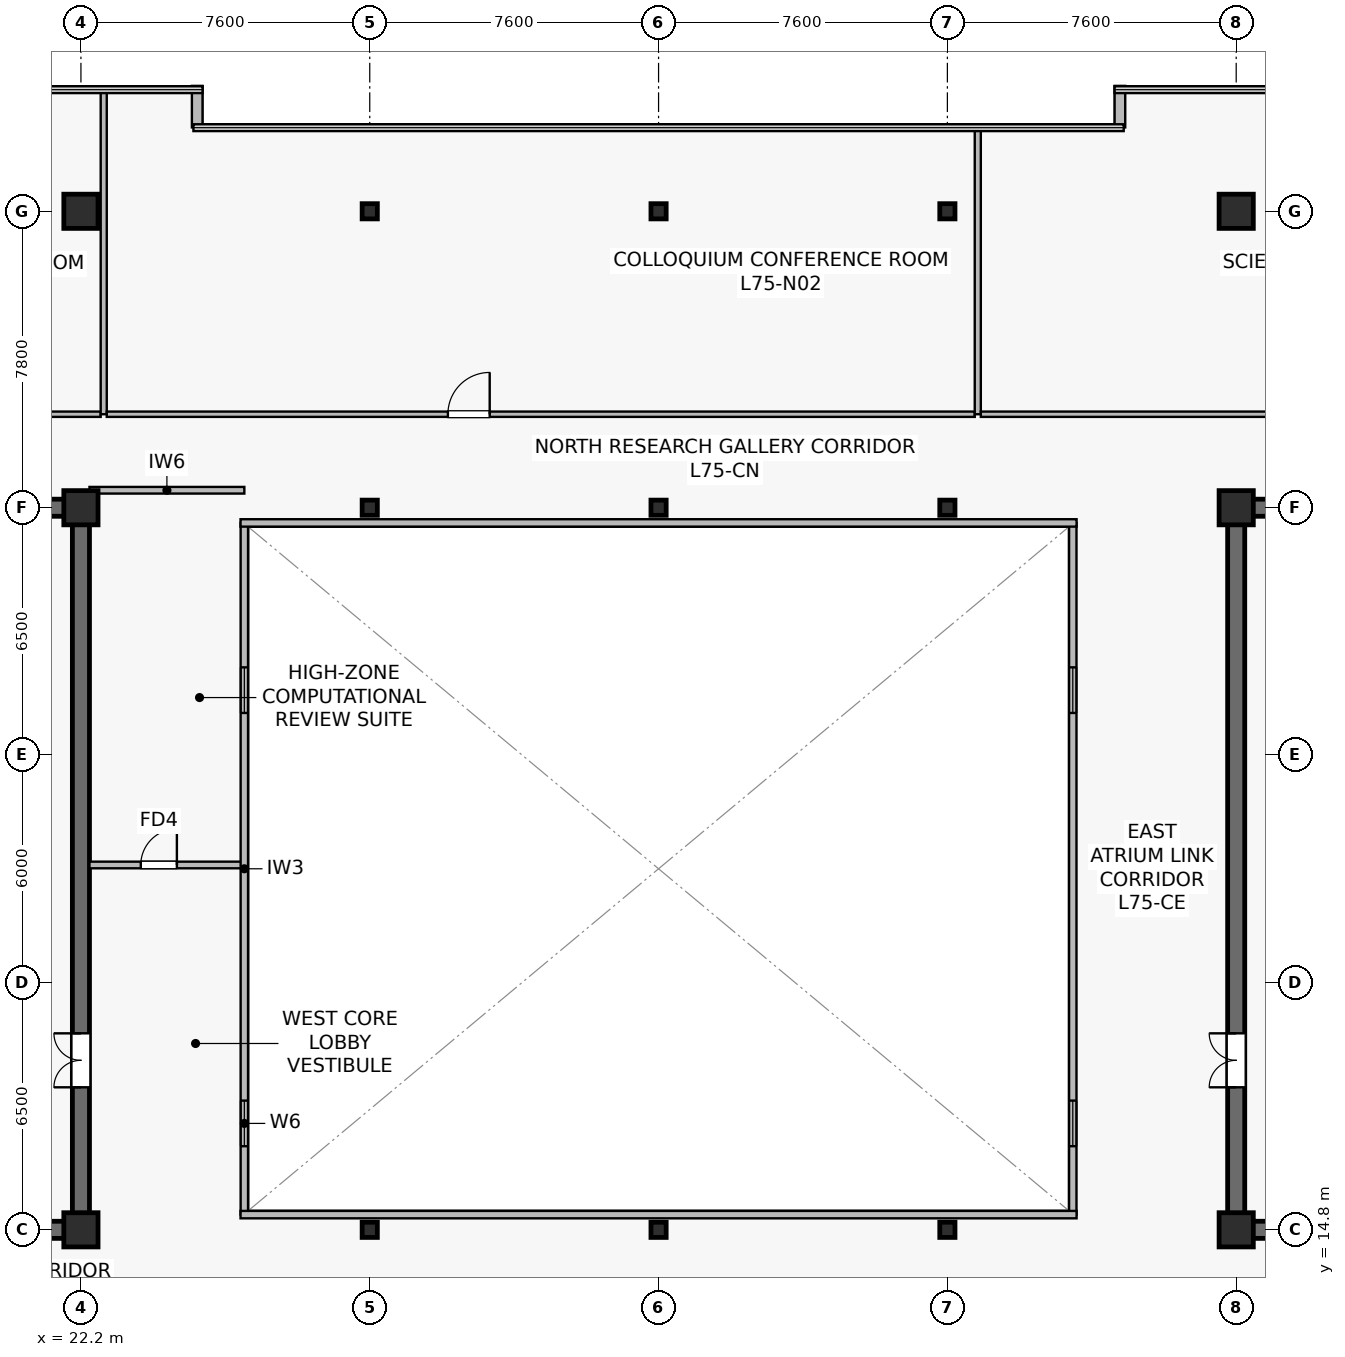
"""IFC4 building model, lengths in metres.
Left out: names, types, materials, properties, quantities, classifications, styles, units other than length and angle.
Written with IfcOpenShell. Run it as: python <this file> out.ifc"""

import sys

from ifc_helpers import new_model, si_unit, direction, frame, frame_2d, origin, origin_2d, place, context, subcontext, project, spatial, rectangle, i_section, extrude, source, transform, mapped, element, fill, save


model = new_model("IFC4")
c1 = context("Model", 3, precision=1e-05, world=origin(), true_north=direction((0.0, 1.0)))
c2 = subcontext(c1, "Body", "Model", "MODEL_VIEW")
j1 = project(units=[si_unit("LENGTHUNIT", "METRE"), si_unit("PLANEANGLEUNIT", "RADIAN")], contexts=[c1])
p1 = place(None, origin())
s1 = spatial("IfcSite", under=j1, at=p1, CompositionType="ELEMENT")
p2 = place(p1, origin())
s2 = spatial("IfcBuilding", under=s1, at=p2, CompositionType="ELEMENT")
p3 = place(p2, frame((0.0, 0.0, 314.4)))
s3 = spatial("IfcBuildingStorey", under=s2, at=p3, CompositionType="ELEMENT", Elevation=314.4)
p4 = place(p3, frame((7.175, 14.8, 0.0), z_axis=(0.0, 0.0, 1.0), x_axis=(1.0, 0.0, 0.0)))
e1 = element("IfcWall", 1, at=p4, inside=s3, PredefinedType="SHEAR", context=c2, shape_type="SweptSolid", body=[
    extrude(rectangle(XDim=15.25, YDim=0.45, at=frame_2d((7.625, 0.0))), origin(), (0.0, 0.0, 1.0), 3.9),
])
p5 = place(p3, frame((7.175, 33.8, 0.0), z_axis=(0.0, 0.0, 1.0), x_axis=(1.0, 0.0, 0.0)))
e2 = element("IfcWall", 2, at=p5, inside=s3, PredefinedType="SHEAR", context=c2, shape_type="SweptSolid", body=[
    extrude(rectangle(XDim=15.25, YDim=0.45, at=frame_2d((7.625, 0.0))), origin(), (0.0, 0.0, 1.0), 3.9),
])
p6 = place(p5, frame((5.15, 0.0, 0.0)))
e3 = element("IfcOpeningElement", 3, at=p6, cuts=e2, PredefinedType="OPENING", context=c2, shape_type="SweptSolid", body=[
    extrude(rectangle(XDim=0.95, YDim=2.15, at=frame_2d((0.475, 1.075))), frame((0.0, 0.235, 0.0), z_axis=(0.0, -1.0, 0.0), x_axis=(1.0, 0.0, 0.0)), (0.0, 0.0, 1.0), 0.47),
])
p7 = place(p5, frame((7.665, 0.0, 0.0)))
e4 = element("IfcOpeningElement", 4, at=p7, cuts=e2, PredefinedType="OPENING", context=c2, shape_type="SweptSolid", body=[
    extrude(rectangle(XDim=0.95, YDim=2.15, at=frame_2d((0.475, 1.075))), frame((0.0, 0.235, 0.0), z_axis=(0.0, -1.0, 0.0), x_axis=(1.0, 0.0, 0.0)), (0.0, 0.0, 1.0), 0.47),
])
p8 = place(p5, frame((10.215, 0.0, 0.0)))
e5 = element("IfcOpeningElement", 5, at=p8, cuts=e2, PredefinedType="OPENING", context=c2, shape_type="SweptSolid", body=[
    extrude(rectangle(XDim=0.95, YDim=2.15, at=frame_2d((0.475, 1.075))), frame((0.0, 0.235, 0.0), z_axis=(0.0, -1.0, 0.0), x_axis=(1.0, 0.0, 0.0)), (0.0, 0.0, 1.0), 0.47),
])
p9 = place(p5, frame((12.765, 0.0, 0.0)))
e6 = element("IfcOpeningElement", 6, at=p9, cuts=e2, PredefinedType="OPENING", context=c2, shape_type="SweptSolid", body=[
    extrude(rectangle(XDim=0.95, YDim=2.15, at=frame_2d((0.475, 1.075))), frame((0.0, 0.235, 0.0), z_axis=(0.0, -1.0, 0.0), x_axis=(1.0, 0.0, 0.0)), (0.0, 0.0, 1.0), 0.47),
])
p10 = place(p3, frame((22.2, 15.025, 0.0), z_axis=(0.0, 0.0, 1.0), x_axis=(0.0, 1.0, 0.0)))
e7 = element("IfcWall", 7, at=p10, inside=s3, PredefinedType="SHEAR", context=c2, shape_type="SweptSolid", body=[
    extrude(rectangle(XDim=18.55, YDim=0.45, at=frame_2d((9.275, 0.0))), origin(), (0.0, 0.0, 1.0), 3.9),
])
p11 = place(p10, frame((3.525, 0.0, 0.0)))
e8 = element("IfcOpeningElement", 8, at=p11, cuts=e7, PredefinedType="OPENING", context=c2, shape_type="SweptSolid", body=[
    extrude(rectangle(XDim=1.42, YDim=2.2, at=frame_2d((0.71, 1.1))), frame((0.0, 0.235, 0.0), z_axis=(0.0, -1.0, 0.0), x_axis=(1.0, 0.0, 0.0)), (0.0, 0.0, 1.0), 0.47),
])
p12 = place(p3, frame((52.375, 14.8, 0.0), z_axis=(0.0, 0.0, 1.0), x_axis=(1.0, 0.0, 0.0)))
e9 = element("IfcWall", 9, at=p12, inside=s3, PredefinedType="SHEAR", context=c2, shape_type="SweptSolid", body=[
    extrude(rectangle(XDim=15.25, YDim=0.45, at=frame_2d((7.625, 0.0))), origin(), (0.0, 0.0, 1.0), 3.9),
])
p13 = place(p3, frame((52.375, 33.8, 0.0), z_axis=(0.0, 0.0, 1.0), x_axis=(1.0, 0.0, 0.0)))
e10 = element("IfcWall", 10, at=p13, inside=s3, PredefinedType="SHEAR", context=c2, shape_type="SweptSolid", body=[
    extrude(rectangle(XDim=15.25, YDim=0.45, at=frame_2d((7.625, 0.0))), origin(), (0.0, 0.0, 1.0), 3.9),
])
p14 = place(p13, frame((9.15, 0.0, 0.0)))
e11 = element("IfcOpeningElement", 11, at=p14, cuts=e10, PredefinedType="OPENING", context=c2, shape_type="SweptSolid", body=[
    extrude(rectangle(XDim=0.95, YDim=2.15, at=frame_2d((0.475, 1.075))), frame((0.0, 0.235, 0.0), z_axis=(0.0, -1.0, 0.0), x_axis=(1.0, 0.0, 0.0)), (0.0, 0.0, 1.0), 0.47),
])
p15 = place(p13, frame((6.635, 0.0, 0.0)))
e12 = element("IfcOpeningElement", 12, at=p15, cuts=e10, PredefinedType="OPENING", context=c2, shape_type="SweptSolid", body=[
    extrude(rectangle(XDim=0.95, YDim=2.15, at=frame_2d((0.475, 1.075))), frame((0.0, 0.235, 0.0), z_axis=(0.0, -1.0, 0.0), x_axis=(1.0, 0.0, 0.0)), (0.0, 0.0, 1.0), 0.47),
])
p16 = place(p13, frame((4.085, 0.0, 0.0)))
e13 = element("IfcOpeningElement", 13, at=p16, cuts=e10, PredefinedType="OPENING", context=c2, shape_type="SweptSolid", body=[
    extrude(rectangle(XDim=0.95, YDim=2.15, at=frame_2d((0.475, 1.075))), frame((0.0, 0.235, 0.0), z_axis=(0.0, -1.0, 0.0), x_axis=(1.0, 0.0, 0.0)), (0.0, 0.0, 1.0), 0.47),
])
p17 = place(p13, frame((1.535, 0.0, 0.0)))
e14 = element("IfcOpeningElement", 14, at=p17, cuts=e10, PredefinedType="OPENING", context=c2, shape_type="SweptSolid", body=[
    extrude(rectangle(XDim=0.95, YDim=2.15, at=frame_2d((0.475, 1.075))), frame((0.0, 0.235, 0.0), z_axis=(0.0, -1.0, 0.0), x_axis=(1.0, 0.0, 0.0)), (0.0, 0.0, 1.0), 0.47),
])
p18 = place(p3, frame((52.6, 15.025, 0.0), z_axis=(0.0, 0.0, 1.0), x_axis=(0.0, 1.0, 0.0)))
e15 = element("IfcWall", 15, at=p18, inside=s3, PredefinedType="SHEAR", context=c2, shape_type="SweptSolid", body=[
    extrude(rectangle(XDim=18.55, YDim=0.45, at=frame_2d((9.275, 0.0))), origin(), (0.0, 0.0, 1.0), 3.9),
])
p19 = place(p18, frame((3.525, 0.0, 0.0)))
e16 = element("IfcOpeningElement", 16, at=p19, cuts=e15, PredefinedType="OPENING", context=c2, shape_type="SweptSolid", body=[
    extrude(rectangle(XDim=1.42, YDim=2.2, at=frame_2d((0.71, 1.1))), frame((0.0, 0.235, 0.0), z_axis=(0.0, -1.0, 0.0), x_axis=(1.0, 0.0, 0.0)), (0.0, 0.0, 1.0), 0.47),
])
m1 = source(origin(), c2, "Body", "SweptSolid", [
    extrude(rectangle(XDim=0.9, YDim=0.9, at=origin_2d()), origin(), (0.0, 0.0, 1.0), 4.2),
])
for number, where, z_axis, x_axis in (
    (17, (22.2, 14.8, 0.0), (0.0, 0.0, 1.0), (1.0, 0.0, 0.0)),
    (18, (22.2, 33.8, 0.0), (0.0, 0.0, 1.0), (1.0, 0.0, 0.0)),
    (19, (22.2, 41.6, 0.0), (0.0, 0.0, 1.0), (1.0, 0.0, 0.0)),
    (20, (52.6, 14.8, 0.0), (0.0, 0.0, 1.0), (1.0, 0.0, 0.0)),
    (21, (52.6, 33.8, 0.0), (0.0, 0.0, 1.0), (1.0, 0.0, 0.0)),
    (22, (52.6, 41.6, 0.0), (0.0, 0.0, 1.0), (1.0, 0.0, 0.0)),
):
    element("IfcColumn", number, at=place(p3, frame(where, z_axis=z_axis, x_axis=x_axis)), inside=s3, PredefinedType="COLUMN", context=c2, shape_type="MappedRepresentation", body=[
        mapped(m1, transform((0.0, 0.0, 0.0), scale=1.0)),
    ])
m2 = source(origin(), c2, "Body", "SweptSolid", [
    extrude(i_section(OverallWidth=0.4, OverallDepth=0.4, WebThickness=0.021, FlangeThickness=0.021, at=origin_2d()), origin(), (0.0, 0.0, 1.0), 4.2),
])
for number, where, z_axis, x_axis in (
    (23, (29.8, 14.8, 0.0), (0.0, 0.0, 1.0), (1.0, 0.0, 0.0)),
    (24, (29.8, 33.8, 0.0), (0.0, 0.0, 1.0), (1.0, 0.0, 0.0)),
    (25, (29.8, 41.6, 0.0), (0.0, 0.0, 1.0), (1.0, 0.0, 0.0)),
    (26, (37.4, 14.8, 0.0), (0.0, 0.0, 1.0), (1.0, 0.0, 0.0)),
    (27, (37.4, 33.8, 0.0), (0.0, 0.0, 1.0), (1.0, 0.0, 0.0)),
    (28, (37.4, 41.6, 0.0), (0.0, 0.0, 1.0), (1.0, 0.0, 0.0)),
    (29, (45.0, 14.8, 0.0), (0.0, 0.0, 1.0), (1.0, 0.0, 0.0)),
    (30, (45.0, 33.8, 0.0), (0.0, 0.0, 1.0), (1.0, 0.0, 0.0)),
    (31, (45.0, 41.6, 0.0), (0.0, 0.0, 1.0), (1.0, 0.0, 0.0)),
):
    element("IfcColumn", number, at=place(p3, frame(where, z_axis=z_axis, x_axis=x_axis)), inside=s3, PredefinedType="COLUMN", context=c2, shape_type="MappedRepresentation", body=[
        mapped(m2, transform((0.0, 0.0, 0.0), scale=1.0)),
    ])
for number, where, z_axis, x_axis in (
    (32, (49.54, 44.9, 0.0), (0.0, 0.0, 1.0), (0.0, -1.0, 0.0)),
    (33, (25.26, 43.807, 0.0), (0.0, 0.0, 1.0), (0.0, 1.0, 0.0)),
):
    element("IfcWall", number, at=place(p3, frame(where, z_axis=z_axis, x_axis=x_axis)), inside=s3, PredefinedType="STANDARD", context=c2, shape_type="SweptSolid", body=[
        extrude(rectangle(XDim=1.093, YDim=0.28, at=frame_2d((0.546, 0.0))), origin(), (0.0, 0.0, 1.0), 3.9),
    ])
p20 = place(p3, frame((22.425, 34.26, 0.0), z_axis=(0.0, 0.0, 1.0), x_axis=(1.0, 0.0, 0.0)))
e34 = element("IfcWall", 34, at=p20, inside=s3, PredefinedType="PARTITIONING", context=c2, shape_type="SweptSolid", body=[
    extrude(rectangle(XDim=4.075, YDim=0.175, at=frame_2d((2.038, 0.0))), origin(), (0.0, 0.0, 1.0), 3.635),
])
p21 = place(p3, frame((22.425, 24.4, 0.0), z_axis=(0.0, 0.0, 1.0), x_axis=(1.0, 0.0, 0.0)))
e35 = element("IfcWall", 35, at=p21, inside=s3, PredefinedType="PARTITIONING", context=c2, shape_type="SweptSolid", body=[
    extrude(rectangle(XDim=4.075, YDim=0.175, at=frame_2d((2.038, 0.0))), origin(), (0.0, 0.0, 1.0), 3.9),
])
p22 = place(p21, frame((1.35, 0.0, 0.0)))
e36 = element("IfcOpeningElement", 36, at=p22, cuts=e35, PredefinedType="OPENING", context=c2, shape_type="SweptSolid", body=[
    extrude(rectangle(XDim=0.95, YDim=2.15, at=frame_2d((0.475, 1.075))), frame((0.0, 0.098, 0.0), z_axis=(0.0, -1.0, 0.0), x_axis=(1.0, 0.0, 0.0)), (0.0, 0.0, 1.0), 0.195),
])
p23 = place(p3, frame((26.5, 15.2, 0.0), z_axis=(0.0, 0.0, 1.0), x_axis=(0.0, 1.0, 0.0)))
e37 = element("IfcWall", 37, at=p23, inside=s3, PredefinedType="SOLIDWALL", context=c2, shape_type="SweptSolid", body=[
    extrude(rectangle(XDim=18.2, YDim=0.195, at=frame_2d((9.1, 0.0))), origin(), (0.0, 0.0, 1.0), 3.9),
])
p24 = place(p23, frame((1.8, 0.0, 0.9)))
e38 = element("IfcOpeningElement", 38, at=p24, cuts=e37, PredefinedType="OPENING", context=c2, shape_type="SweptSolid", body=[
    extrude(rectangle(XDim=1.2, YDim=1.35, at=frame_2d((0.6, 0.675))), frame((0.0, 0.107, 0.0), z_axis=(0.0, -1.0, 0.0), x_axis=(1.0, 0.0, 0.0)), (0.0, 0.0, 1.0), 0.215),
])
p25 = place(p23, frame((13.2, 0.0, 0.9)))
e39 = element("IfcOpeningElement", 39, at=p25, cuts=e37, PredefinedType="OPENING", context=c2, shape_type="SweptSolid", body=[
    extrude(rectangle(XDim=1.2, YDim=1.35, at=frame_2d((0.6, 0.675))), frame((0.0, 0.107, 0.0), z_axis=(0.0, -1.0, 0.0), x_axis=(1.0, 0.0, 0.0)), (0.0, 0.0, 1.0), 0.215),
])
p26 = place(p3, frame((48.3, 15.2, 0.0), z_axis=(0.0, 0.0, 1.0), x_axis=(0.0, 1.0, 0.0)))
e40 = element("IfcWall", 40, at=p26, inside=s3, PredefinedType="SOLIDWALL", context=c2, shape_type="SweptSolid", body=[
    extrude(rectangle(XDim=18.2, YDim=0.195, at=frame_2d((9.1, 0.0))), origin(), (0.0, 0.0, 1.0), 3.9),
])
p27 = place(p26, frame((1.8, 0.0, 0.9)))
e41 = element("IfcOpeningElement", 41, at=p27, cuts=e40, PredefinedType="OPENING", context=c2, shape_type="SweptSolid", body=[
    extrude(rectangle(XDim=1.2, YDim=1.35, at=frame_2d((0.6, 0.675))), frame((0.0, 0.107, 0.0), z_axis=(0.0, -1.0, 0.0), x_axis=(1.0, 0.0, 0.0)), (0.0, 0.0, 1.0), 0.215),
])
p28 = place(p26, frame((13.2, 0.0, 0.9)))
e42 = element("IfcOpeningElement", 42, at=p28, cuts=e40, PredefinedType="OPENING", context=c2, shape_type="SweptSolid", body=[
    extrude(rectangle(XDim=1.2, YDim=1.35, at=frame_2d((0.6, 0.675))), frame((0.0, 0.107, 0.0), z_axis=(0.0, -1.0, 0.0), x_axis=(1.0, 0.0, 0.0)), (0.0, 0.0, 1.0), 0.215),
])
for number, where, z_axis, x_axis in (
    (43, (26.4, 15.2, 0.0), (0.0, 0.0, 1.0), (1.0, 0.0, 0.0)),
    (44, (26.4, 33.4, 0.0), (0.0, 0.0, 1.0), (1.0, 0.0, 0.0)),
):
    element("IfcWall", number, at=place(p3, frame(where, z_axis=z_axis, x_axis=x_axis)), inside=s3, PredefinedType="SOLIDWALL", context=c2, shape_type="SweptSolid", body=[
        extrude(rectangle(XDim=22.0, YDim=0.195, at=frame_2d((11.0, 0.0))), origin(), (0.0, 0.0, 1.0), 3.9),
    ])
p29 = place(p3, frame((5.91, 36.26, 0.0), z_axis=(0.0, 0.0, 1.0), x_axis=(1.0, 0.0, 0.0)))
e45 = element("IfcWall", 45, at=p29, inside=s3, PredefinedType="PARTITIONING", context=c2, shape_type="SweptSolid", body=[
    extrude(rectangle(XDim=16.81, YDim=0.14, at=frame_2d((8.405, 0.0))), origin(), (0.0, 0.0, 1.0), 3.297),
])
p30 = place(p29, frame((8.305, 0.0, 0.0)))
e46 = element("IfcOpeningElement", 46, at=p30, cuts=e45, PredefinedType="OPENING", context=c2, shape_type="SweptSolid", body=[
    extrude(rectangle(XDim=1.1, YDim=2.18, at=frame_2d((0.55, 1.09))), frame((0.0, 0.08, 0.0), z_axis=(0.0, -1.0, 0.0), x_axis=(1.0, 0.0, 0.0)), (0.0, 0.0, 1.0), 0.16),
])
p31 = place(p3, frame((22.8, 36.26, 0.0), z_axis=(0.0, 0.0, 1.0), x_axis=(0.0, 1.0, 0.0)))
e47 = element("IfcWall", 47, at=p31, inside=s3, PredefinedType="PARTITIONING", context=c2, shape_type="SweptSolid", body=[
    extrude(rectangle(XDim=8.53, YDim=0.16, at=frame_2d((4.265, 0.0))), origin(), (0.0, 0.0, 1.0), 2.985),
])
p32 = place(p3, frame((22.88, 36.26, 0.0), z_axis=(0.0, 0.0, 1.0), x_axis=(1.0, 0.0, 0.0)))
e48 = element("IfcWall", 48, at=p32, inside=s3, PredefinedType="PARTITIONING", context=c2, shape_type="SweptSolid", body=[
    extrude(rectangle(XDim=22.84, YDim=0.14, at=frame_2d((11.42, 0.0))), origin(), (0.0, 0.0, 1.0), 3.297),
])
p33 = place(p32, frame((8.976, 0.0, 0.0)))
e49 = element("IfcOpeningElement", 49, at=p33, cuts=e48, PredefinedType="OPENING", context=c2, shape_type="SweptSolid", body=[
    extrude(rectangle(XDim=1.1, YDim=2.18, at=frame_2d((0.55, 1.09))), frame((0.0, 0.08, 0.0), z_axis=(0.0, -1.0, 0.0), x_axis=(1.0, 0.0, 0.0)), (0.0, 0.0, 1.0), 0.16),
])
p34 = place(p3, frame((45.8, 36.26, 0.0), z_axis=(0.0, 0.0, 1.0), x_axis=(0.0, 1.0, 0.0)))
e50 = element("IfcWall", 50, at=p34, inside=s3, PredefinedType="PARTITIONING", context=c2, shape_type="SweptSolid", body=[
    extrude(rectangle(XDim=7.53, YDim=0.16, at=frame_2d((3.765, 0.0))), origin(), (0.0, 0.0, 1.0), 2.985),
])
p35 = place(p3, frame((45.88, 36.26, 0.0), z_axis=(0.0, 0.0, 1.0), x_axis=(1.0, 0.0, 0.0)))
e51 = element("IfcWall", 51, at=p35, inside=s3, PredefinedType="PARTITIONING", context=c2, shape_type="SweptSolid", body=[
    extrude(rectangle(XDim=23.01, YDim=0.14, at=frame_2d((11.505, 0.0))), origin(), (0.0, 0.0, 1.0), 3.297),
])
p36 = place(p35, frame((11.591, 0.0, 0.0)))
e52 = element("IfcOpeningElement", 52, at=p36, cuts=e51, PredefinedType="OPENING", context=c2, shape_type="SweptSolid", body=[
    extrude(rectangle(XDim=1.1, YDim=2.18, at=frame_2d((0.55, 1.09))), frame((0.0, 0.08, 0.0), z_axis=(0.0, -1.0, 0.0), x_axis=(1.0, 0.0, 0.0)), (0.0, 0.0, 1.0), 0.16),
])
m3 = source(origin(), c2, "Body", "SweptSolid", [
    extrude(rectangle(XDim=1.2, YDim=1.35, at=frame_2d((0.6, 0.675))), frame((0.0, 0.03, 0.0), z_axis=(0.0, -1.0, 0.0), x_axis=(1.0, 0.0, 0.0)), (0.0, 0.0, 1.0), 0.06),
])
p37 = place(p24, origin())
e53 = element("IfcWindow", 53, at=p37, inside=s3, PartitioningType="SINGLE_PANEL", PredefinedType="WINDOW", context=c2, shape_type="MappedRepresentation", body=[
    mapped(m3, transform((0.0, 0.0, 0.0), scale=1.0)),
])
fill(e38, e53)
p38 = place(p25, origin())
e54 = element("IfcWindow", 54, at=p38, inside=s3, PartitioningType="SINGLE_PANEL", PredefinedType="WINDOW", context=c2, shape_type="MappedRepresentation", body=[
    mapped(m3, transform((0.0, 0.0, 0.0), scale=1.0)),
])
fill(e39, e54)
p39 = place(p27, origin())
e55 = element("IfcWindow", 55, at=p39, inside=s3, PartitioningType="SINGLE_PANEL", PredefinedType="WINDOW", context=c2, shape_type="MappedRepresentation", body=[
    mapped(m3, transform((0.0, 0.0, 0.0), scale=1.0)),
])
fill(e41, e55)
p40 = place(p28, origin())
e56 = element("IfcWindow", 56, at=p40, inside=s3, PartitioningType="SINGLE_PANEL", PredefinedType="WINDOW", context=c2, shape_type="MappedRepresentation", body=[
    mapped(m3, transform((0.0, 0.0, 0.0), scale=1.0)),
])
fill(e42, e56)
m4 = source(origin(), c2, "Body", "SweptSolid", [
    extrude(rectangle(XDim=1.42, YDim=2.2, at=frame_2d((0.71, 1.1))), frame((0.0, 0.025, 0.0), z_axis=(0.0, -1.0, 0.0), x_axis=(1.0, 0.0, 0.0)), (0.0, 0.0, 1.0), 0.05),
])
p41 = place(p11, origin())
e57 = element("IfcDoor", 57, at=p41, inside=s3, OperationType="DOUBLE_DOOR_SINGLE_SWING", PredefinedType="DOOR", context=c2, shape_type="MappedRepresentation", body=[
    mapped(m4, transform((0.0, 0.0, 0.0), scale=1.0)),
])
fill(e8, e57)
p42 = place(p19, origin())
e58 = element("IfcDoor", 58, at=p42, inside=s3, OperationType="DOUBLE_DOOR_SINGLE_SWING", PredefinedType="DOOR", context=c2, shape_type="MappedRepresentation", body=[
    mapped(m4, transform((0.0, 0.0, 0.0), scale=1.0)),
])
fill(e16, e58)
m5 = source(origin(), c2, "Body", "SweptSolid", [
    extrude(rectangle(XDim=0.95, YDim=2.15, at=frame_2d((0.475, 1.075))), frame((0.0, 0.025, 0.0), z_axis=(0.0, -1.0, 0.0), x_axis=(1.0, 0.0, 0.0)), (0.0, 0.0, 1.0), 0.05),
])
p43 = place(p22, origin())
e59 = element("IfcDoor", 59, at=p43, inside=s3, OperationType="SINGLE_SWING_RIGHT", PredefinedType="DOOR", context=c2, shape_type="MappedRepresentation", body=[
    mapped(m5, transform((0.0, 0.0, 0.0), scale=1.0)),
])
fill(e36, e59)
m6 = source(origin(), c2, "Body", "SweptSolid", [
    extrude(rectangle(XDim=1.1, YDim=2.18, at=frame_2d((0.55, 1.09))), frame((0.0, 0.025, 0.0), z_axis=(0.0, -1.0, 0.0), x_axis=(1.0, 0.0, 0.0)), (0.0, 0.0, 1.0), 0.05),
])
p44 = place(p33, origin())
e60 = element("IfcDoor", 60, at=p44, inside=s3, OperationType="SINGLE_SWING_RIGHT", PredefinedType="DOOR", context=c2, shape_type="MappedRepresentation", body=[
    mapped(m6, transform((0.0, 0.0, 0.0), scale=1.0)),
])
fill(e49, e60)
save(model, sys.argv[1])
